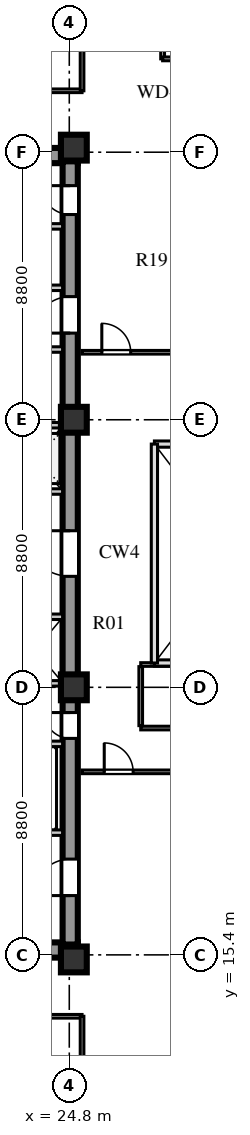
"""IFC4 building model, lengths in metres.
Left out: names, types, materials, properties, quantities, classifications, styles, units other than length and angle.
Written with IfcOpenShell. Run it as: python <this file> out.ifc"""

import sys

from ifc_helpers import new_model, si_unit, direction, frame, frame_2d, origin, origin_2d, place, context, subcontext, project, spatial, rectangle, extrude, element, fill, save


model = new_model("IFC4")
c1 = context("Model", 3, precision=1e-05, world=origin(), true_north=direction((0.0, 1.0)))
c2 = subcontext(c1, "Body", "Model", "MODEL_VIEW")
j1 = project(units=[si_unit("LENGTHUNIT", "METRE"), si_unit("PLANEANGLEUNIT", "RADIAN")], contexts=[c1])
p1 = place(None, origin())
s1 = spatial("IfcSite", under=j1, at=p1, CompositionType="ELEMENT")
p2 = place(p1, origin())
s2 = spatial("IfcBuilding", under=s1, at=p2, CompositionType="ELEMENT")
p3 = place(p2, frame((0.0, 0.0, 104.0)))
s3 = spatial("IfcBuildingStorey", under=s2, at=p3, CompositionType="ELEMENT", Elevation=104.0)
for number, where, z_axis, x_axis in (
    (1, (15.4, 15.56, 0.0), (0.0, 0.0, 1.0), (1.0, 0.0, 0.0)),
    (2, (15.4, 41.69, 0.0), (0.0, 0.0, 1.0), (1.0, 0.0, 0.0)),
):
    element("IfcWall", number, at=place(p3, frame(where, z_axis=z_axis, x_axis=x_axis)), inside=s3, PredefinedType="SHEAR", context=c2, shape_type="SweptSolid", body=[
        extrude(rectangle(XDim=9.68, YDim=0.5, at=frame_2d((4.84, 0.0))), origin(), (0.0, 0.0, 1.0), 3.6),
    ])
p4 = place(p3, frame((24.83, 15.74, 0.0), z_axis=(0.0, 0.0, 1.0), x_axis=(0.0, 1.0, 0.0)))
e3 = element("IfcWall", 3, at=p4, inside=s3, PredefinedType="SHEAR", context=c2, shape_type="SweptSolid", body=[
    extrude(rectangle(XDim=25.76, YDim=0.5, at=frame_2d((12.88, 0.0))), origin(), (0.0, 0.0, 1.0), 3.6),
])
p5 = place(p4, frame((1.61, 0.0, 0.0)))
e4 = element("IfcOpeningElement", 4, at=p5, cuts=e3, PredefinedType="OPENING", context=c2, shape_type="SweptSolid", body=[
    extrude(rectangle(XDim=1.2, YDim=2.1, at=frame_2d((0.6, 1.05))), frame((0.0, 0.26, 0.0), z_axis=(0.0, -1.0, 0.0), x_axis=(1.0, 0.0, 0.0)), (0.0, 0.0, 1.0), 0.52),
])
p6 = place(p4, frame((6.78, 0.0, 0.0)))
e5 = element("IfcOpeningElement", 5, at=p6, cuts=e3, PredefinedType="OPENING", context=c2, shape_type="SweptSolid", body=[
    extrude(rectangle(XDim=0.85, YDim=2.06, at=frame_2d((0.425, 1.03))), frame((0.0, 0.26, 0.0), z_axis=(0.0, -1.0, 0.0), x_axis=(1.0, 0.0, 0.0)), (0.0, 0.0, 1.0), 0.52),
])
p7 = place(p4, frame((12.11, 0.0, 0.0)))
e6 = element("IfcOpeningElement", 6, at=p7, cuts=e3, PredefinedType="OPENING", context=c2, shape_type="SweptSolid", body=[
    extrude(rectangle(XDim=1.5, YDim=2.12, at=frame_2d((0.75, 1.06))), frame((0.0, 0.26, 0.0), z_axis=(0.0, -1.0, 0.0), x_axis=(1.0, 0.0, 0.0)), (0.0, 0.0, 1.0), 0.52),
])
p8 = place(p4, frame((20.11, 0.0, 0.0)))
e7 = element("IfcOpeningElement", 7, at=p8, cuts=e3, PredefinedType="OPENING", context=c2, shape_type="SweptSolid", body=[
    extrude(rectangle(XDim=1.2, YDim=2.12, at=frame_2d((0.6, 1.06))), frame((0.0, 0.26, 0.0), z_axis=(0.0, -1.0, 0.0), x_axis=(1.0, 0.0, 0.0)), (0.0, 0.0, 1.0), 0.52),
])
p9 = place(p4, frame((24.01, 0.0, 0.0)))
e8 = element("IfcOpeningElement", 8, at=p9, cuts=e3, PredefinedType="OPENING", context=c2, shape_type="SweptSolid", body=[
    extrude(rectangle(XDim=0.95, YDim=2.1, at=frame_2d((0.475, 1.05))), frame((0.0, 0.26, 0.0), z_axis=(0.0, -1.0, 0.0), x_axis=(1.0, 0.0, 0.0)), (0.0, 0.0, 1.0), 0.52),
])
for number, where, z_axis, x_axis in (
    (9, (24.95, 15.25, 0.0), (0.0, 0.0, 1.0), (1.0, 0.0, 0.0)),
    (10, (24.95, 24.2, 0.0), (0.0, 0.0, 1.0), (1.0, 0.0, 0.0)),
    (11, (24.95, 33.0, 0.0), (0.0, 0.0, 1.0), (1.0, 0.0, 0.0)),
    (12, (24.95, 41.95, 0.0), (0.0, 0.0, 1.0), (1.0, 0.0, 0.0)),
):
    element("IfcColumn", number, at=place(p3, frame(where, z_axis=z_axis, x_axis=x_axis)), inside=s3, PredefinedType="COLUMN", context=c2, shape_type="SweptSolid", body=[
        extrude(rectangle(XDim=0.85, YDim=0.85, at=origin_2d()), origin(), (0.0, 0.0, 1.0), 3.6),
    ])
p10 = place(p3, frame((19.64, 19.42, 0.0), z_axis=(0.0, 0.0, 1.0), x_axis=(1.0, 0.0, 0.0)))
e13 = element("IfcWall", 13, at=p10, inside=s3, PredefinedType="SOLIDWALL", context=c2, shape_type="SweptSolid", body=[
    extrude(rectangle(XDim=4.94, YDim=0.18, at=frame_2d((2.47, 0.0))), origin(), (0.0, 0.0, 1.0), 3.6),
])
p11 = place(p10, frame((0.72, 0.0, 0.0)))
e14 = element("IfcOpeningElement", 14, at=p11, cuts=e13, PredefinedType="OPENING", context=c2, shape_type="SweptSolid", body=[
    extrude(rectangle(XDim=1.1, YDim=2.1, at=frame_2d((0.55, 1.05))), frame((0.0, 0.1, 0.0), z_axis=(0.0, -1.0, 0.0), x_axis=(1.0, 0.0, 0.0)), (0.0, 0.0, 1.0), 0.2),
])
p12 = place(p10, frame((3.02, 0.0, 0.0)))
e15 = element("IfcOpeningElement", 15, at=p12, cuts=e13, PredefinedType="OPENING", context=c2, shape_type="SweptSolid", body=[
    extrude(rectangle(XDim=1.1, YDim=2.1, at=frame_2d((0.55, 1.05))), frame((0.0, 0.1, 0.0), z_axis=(0.0, -1.0, 0.0), x_axis=(1.0, 0.0, 0.0)), (0.0, 0.0, 1.0), 0.2),
])
p13 = place(p3, frame((19.64, 22.34, 0.0), z_axis=(0.0, 0.0, 1.0), x_axis=(1.0, 0.0, 0.0)))
e16 = element("IfcWall", 16, at=p13, inside=s3, PredefinedType="SOLIDWALL", context=c2, shape_type="SweptSolid", body=[
    extrude(rectangle(XDim=4.94, YDim=0.18, at=frame_2d((2.47, 0.0))), origin(), (0.0, 0.0, 1.0), 3.6),
])
p14 = place(p3, frame((15.9, 26.52, 0.0), z_axis=(0.0, 0.0, 1.0), x_axis=(1.0, 0.0, 0.0)))
e17 = element("IfcWall", 17, at=p14, inside=s3, PredefinedType="SOLIDWALL", context=c2, shape_type="SweptSolid", body=[
    extrude(rectangle(XDim=8.68, YDim=0.18, at=frame_2d((4.34, 0.0))), origin(), (0.0, 0.0, 1.0), 3.6),
])
p15 = place(p3, frame((15.9, 24.33, 0.0), z_axis=(0.0, 0.0, 1.0), x_axis=(1.0, 0.0, 0.0)))
e18 = element("IfcWall", 18, at=p15, inside=s3, PredefinedType="SOLIDWALL", context=c2, shape_type="SweptSolid", body=[
    extrude(rectangle(XDim=8.68, YDim=0.18, at=frame_2d((4.34, 0.0))), origin(), (0.0, 0.0, 1.0), 2.95),
])
p16 = place(p3, frame((15.9, 30.64, 0.0), z_axis=(0.0, 0.0, 1.0), x_axis=(1.0, 0.0, 0.0)))
e19 = element("IfcWall", 19, at=p16, inside=s3, PredefinedType="SOLIDWALL", context=c2, shape_type="SweptSolid", body=[
    extrude(rectangle(XDim=8.68, YDim=0.18, at=frame_2d((4.34, 0.0))), origin(), (0.0, 0.0, 1.0), 3.6),
])
p17 = place(p16, frame((1.76, 0.0, 0.0)))
e20 = element("IfcOpeningElement", 20, at=p17, cuts=e19, PredefinedType="OPENING", context=c2, shape_type="SweptSolid", body=[
    extrude(rectangle(XDim=1.0, YDim=2.1, at=frame_2d((0.5, 1.05))), frame((0.0, 0.1, 0.0), z_axis=(0.0, -1.0, 0.0), x_axis=(1.0, 0.0, 0.0)), (0.0, 0.0, 1.0), 0.2),
])
p18 = place(p16, frame((3.6, 0.0, 0.0)))
e21 = element("IfcOpeningElement", 21, at=p18, cuts=e19, PredefinedType="OPENING", context=c2, shape_type="SweptSolid", body=[
    extrude(rectangle(XDim=1.0, YDim=2.1, at=frame_2d((0.5, 1.05))), frame((0.0, 0.1, 0.0), z_axis=(0.0, -1.0, 0.0), x_axis=(1.0, 0.0, 0.0)), (0.0, 0.0, 1.0), 0.2),
])
p19 = place(p16, frame((5.44, 0.0, 0.0)))
e22 = element("IfcOpeningElement", 22, at=p19, cuts=e19, PredefinedType="OPENING", context=c2, shape_type="SweptSolid", body=[
    extrude(rectangle(XDim=1.0, YDim=2.1, at=frame_2d((0.5, 1.05))), frame((0.0, 0.1, 0.0), z_axis=(0.0, -1.0, 0.0), x_axis=(1.0, 0.0, 0.0)), (0.0, 0.0, 1.0), 0.2),
])
p20 = place(p16, frame((7.28, 0.0, 0.0)))
e23 = element("IfcOpeningElement", 23, at=p20, cuts=e19, PredefinedType="OPENING", context=c2, shape_type="SweptSolid", body=[
    extrude(rectangle(XDim=1.0, YDim=2.1, at=frame_2d((0.5, 1.05))), frame((0.0, 0.1, 0.0), z_axis=(0.0, -1.0, 0.0), x_axis=(1.0, 0.0, 0.0)), (0.0, 0.0, 1.0), 0.2),
])
p21 = place(p3, frame((15.9, 32.82, 0.0), z_axis=(0.0, 0.0, 1.0), x_axis=(1.0, 0.0, 0.0)))
e24 = element("IfcWall", 24, at=p21, inside=s3, PredefinedType="SOLIDWALL", context=c2, shape_type="SweptSolid", body=[
    extrude(rectangle(XDim=8.68, YDim=0.18, at=frame_2d((4.34, 0.0))), origin(), (0.0, 0.0, 1.0), 2.95),
])
p22 = place(p3, frame((22.02, 35.31, 0.0), z_axis=(0.0, 0.0, 1.0), x_axis=(1.0, 0.0, 0.0)))
e25 = element("IfcWall", 25, at=p22, inside=s3, PredefinedType="SOLIDWALL", context=c2, shape_type="SweptSolid", body=[
    extrude(rectangle(XDim=2.56, YDim=0.18, at=frame_2d((1.28, 0.0))), origin(), (0.0, 0.0, 1.0), 3.6),
])
p23 = place(p22, frame((0.55, 0.0, 0.0)))
e26 = element("IfcOpeningElement", 26, at=p23, cuts=e25, PredefinedType="OPENING", context=c2, shape_type="SweptSolid", body=[
    extrude(rectangle(XDim=1.0, YDim=2.1, at=frame_2d((0.5, 1.05))), frame((0.0, 0.1, 0.0), z_axis=(0.0, -1.0, 0.0), x_axis=(1.0, 0.0, 0.0)), (0.0, 0.0, 1.0), 0.2),
])
p24 = place(p3, frame((19.64, 37.34, 0.0), z_axis=(0.0, 0.0, 1.0), x_axis=(1.0, 0.0, 0.0)))
e27 = element("IfcWall", 27, at=p24, inside=s3, PredefinedType="SOLIDWALL", context=c2, shape_type="SweptSolid", body=[
    extrude(rectangle(XDim=4.94, YDim=0.18, at=frame_2d((2.47, 0.0))), origin(), (0.0, 0.0, 1.0), 3.6),
])
p25 = place(p24, frame((0.45, 0.0, 0.0)))
e28 = element("IfcOpeningElement", 28, at=p25, cuts=e27, PredefinedType="OPENING", context=c2, shape_type="SweptSolid", body=[
    extrude(rectangle(XDim=1.0, YDim=2.1, at=frame_2d((0.5, 1.05))), frame((0.0, 0.1, 0.0), z_axis=(0.0, -1.0, 0.0), x_axis=(1.0, 0.0, 0.0)), (0.0, 0.0, 1.0), 0.2),
])
p26 = place(p24, frame((2.5, 0.0, 0.0)))
e29 = element("IfcOpeningElement", 29, at=p26, cuts=e27, PredefinedType="OPENING", context=c2, shape_type="SweptSolid", body=[
    extrude(rectangle(XDim=1.0, YDim=2.1, at=frame_2d((0.5, 1.05))), frame((0.0, 0.1, 0.0), z_axis=(0.0, -1.0, 0.0), x_axis=(1.0, 0.0, 0.0)), (0.0, 0.0, 1.0), 0.2),
])
p27 = place(p3, frame((19.64, 39.36, 0.0), z_axis=(0.0, 0.0, 1.0), x_axis=(1.0, 0.0, 0.0)))
e30 = element("IfcWall", 30, at=p27, inside=s3, PredefinedType="SOLIDWALL", context=c2, shape_type="SweptSolid", body=[
    extrude(rectangle(XDim=4.94, YDim=0.18, at=frame_2d((2.47, 0.0))), origin(), (0.0, 0.0, 1.0), 3.6),
])
p28 = place(p3, frame((25.22, 21.42, 0.0), z_axis=(0.0, 0.0, 1.0), x_axis=(1.0, 0.0, 0.0)))
e31 = element("IfcWall", 31, at=p28, inside=s3, PredefinedType="PARTITIONING", context=c2, shape_type="SweptSolid", body=[
    extrude(rectangle(XDim=15.6, YDim=0.12, at=frame_2d((7.8, 0.0))), origin(), (0.0, 0.0, 1.0), 3.2),
])
p29 = place(p28, frame((0.73, 0.0, 0.0)))
e32 = element("IfcOpeningElement", 32, at=p29, cuts=e31, PredefinedType="OPENING", context=c2, shape_type="SweptSolid", body=[
    extrude(rectangle(XDim=0.95, YDim=2.1, at=frame_2d((0.475, 1.05))), frame((0.0, 0.07, 0.0), z_axis=(0.0, -1.0, 0.0), x_axis=(1.0, 0.0, 0.0)), (0.0, 0.0, 1.0), 0.14),
])
p30 = place(p3, frame((27.15, 22.86, 0.0), z_axis=(0.0, 0.0, 1.0), x_axis=(1.0, 0.0, 0.0)))
e33 = element("IfcWall", 33, at=p30, inside=s3, PredefinedType="PARTITIONING", context=c2, shape_type="SweptSolid", body=[
    extrude(rectangle(XDim=13.67, YDim=0.12, at=frame_2d((6.835, 0.0))), origin(), (0.0, 0.0, 1.0), 3.6),
])
p31 = place(p30, frame((2.2, 0.0, 0.0)))
e34 = element("IfcOpeningElement", 34, at=p31, cuts=e33, PredefinedType="OPENING", context=c2, shape_type="SweptSolid", body=[
    extrude(rectangle(XDim=0.9, YDim=2.08, at=frame_2d((0.45, 1.04))), frame((0.0, 0.07, 0.0), z_axis=(0.0, -1.0, 0.0), x_axis=(1.0, 0.0, 0.0)), (0.0, 0.0, 1.0), 0.14),
])
p32 = place(p3, frame((25.22, 35.22, 0.0), z_axis=(0.0, 0.0, 1.0), x_axis=(1.0, 0.0, 0.0)))
e35 = element("IfcWall", 35, at=p32, inside=s3, PredefinedType="PARTITIONING", context=c2, shape_type="SweptSolid", body=[
    extrude(rectangle(XDim=9.5, YDim=0.12, at=frame_2d((4.75, 0.0))), origin(), (0.0, 0.0, 1.0), 3.6),
])
p33 = place(p32, frame((0.65, 0.0, 0.0)))
e36 = element("IfcOpeningElement", 36, at=p33, cuts=e35, PredefinedType="OPENING", context=c2, shape_type="SweptSolid", body=[
    extrude(rectangle(XDim=0.95, YDim=2.1, at=frame_2d((0.475, 1.05))), frame((0.0, 0.07, 0.0), z_axis=(0.0, -1.0, 0.0), x_axis=(1.0, 0.0, 0.0)), (0.0, 0.0, 1.0), 0.14),
])
p34 = place(p32, frame((5.4, 0.0, 0.0)))
e37 = element("IfcOpeningElement", 37, at=p34, cuts=e35, PredefinedType="OPENING", context=c2, shape_type="SweptSolid", body=[
    extrude(rectangle(XDim=1.05, YDim=2.1, at=frame_2d((0.525, 1.05))), frame((0.0, 0.07, 0.0), z_axis=(0.0, -1.0, 0.0), x_axis=(1.0, 0.0, 0.0)), (0.0, 0.0, 1.0), 0.14),
])
p35 = place(p3, frame((13.59, 13.38, 0.0), z_axis=(0.0, 0.0, 1.0), x_axis=(1.0, 0.0, 0.0)))
e38 = element("IfcWall", 38, at=p35, inside=s3, PredefinedType="PARTITIONING", context=c2, shape_type="SweptSolid", body=[
    extrude(rectangle(XDim=11.63, YDim=0.12, at=frame_2d((5.815, 0.0))), origin(), (0.0, 0.0, 1.0), 3.6),
])
p36 = place(p35, frame((4.56, 0.0, 0.0)))
e39 = element("IfcOpeningElement", 39, at=p36, cuts=e38, PredefinedType="OPENING", context=c2, shape_type="SweptSolid", body=[
    extrude(rectangle(XDim=1.0, YDim=2.08, at=frame_2d((0.5, 1.04))), frame((0.0, 0.07, 0.0), z_axis=(0.0, -1.0, 0.0), x_axis=(1.0, 0.0, 0.0)), (0.0, 0.0, 1.0), 0.14),
])
p37 = place(p3, frame((25.22, 10.28, 0.0), z_axis=(0.0, 0.0, 1.0), x_axis=(0.0, 1.0, 0.0)))
e40 = element("IfcWall", 40, at=p37, inside=s3, PredefinedType="PARTITIONING", context=c2, shape_type="SweptSolid", body=[
    extrude(rectangle(XDim=3.1, YDim=0.12, at=frame_2d((1.55, 0.0))), origin(), (0.0, 0.0, 1.0), 3.1),
])
p38 = place(p3, frame((13.59, 43.82, 0.0), z_axis=(0.0, 0.0, 1.0), x_axis=(1.0, 0.0, 0.0)))
e41 = element("IfcWall", 41, at=p38, inside=s3, PredefinedType="PARTITIONING", context=c2, shape_type="SweptSolid", body=[
    extrude(rectangle(XDim=11.63, YDim=0.12, at=frame_2d((5.815, 0.0))), origin(), (0.0, 0.0, 1.0), 3.6),
])
p39 = place(p38, frame((4.56, 0.0, 0.0)))
e42 = element("IfcOpeningElement", 42, at=p39, cuts=e41, PredefinedType="OPENING", context=c2, shape_type="SweptSolid", body=[
    extrude(rectangle(XDim=1.0, YDim=2.08, at=frame_2d((0.5, 1.04))), frame((0.0, 0.07, 0.0), z_axis=(0.0, -1.0, 0.0), x_axis=(1.0, 0.0, 0.0)), (0.0, 0.0, 1.0), 0.14),
])
p40 = place(p3, frame((25.22, 43.82, 0.0), z_axis=(0.0, 0.0, 1.0), x_axis=(0.0, 1.0, 0.0)))
e43 = element("IfcWall", 43, at=p40, inside=s3, PredefinedType="PARTITIONING", context=c2, shape_type="SweptSolid", body=[
    extrude(rectangle(XDim=3.1, YDim=0.12, at=frame_2d((1.55, 0.0))), origin(), (0.0, 0.0, 1.0), 3.1),
])
p41 = place(p3, frame((27.15, 24.95, 0.0), z_axis=(0.0, 0.0, 1.0), x_axis=(1.0, 0.0, 0.0)))
e44 = element("IfcWall", 44, at=p41, inside=s3, PredefinedType="PARTITIONING", context=c2, shape_type="SweptSolid", body=[
    extrude(rectangle(XDim=9.67, YDim=0.12, at=frame_2d((4.835, 0.0))), origin(), (0.0, 0.0, 1.0), 3.05),
])
p42 = place(p3, frame((27.15, 22.94, 0.0), z_axis=(0.0, 0.0, 1.0), x_axis=(0.0, 1.0, 0.0)))
e45 = element("IfcWall", 45, at=p42, inside=s3, PredefinedType="PARTITIONING", context=c2, shape_type="SweptSolid", body=[
    extrude(rectangle(XDim=1.94, YDim=0.12, at=frame_2d((0.97, 0.0))), origin(), (0.0, 0.0, 1.0), 3.6),
])
p43 = place(p3, frame((27.87, 44.87, 0.0), z_axis=(0.0, 0.0, 1.0), x_axis=(0.0, 1.0, 0.0)))
e46 = element("IfcWall", 46, at=p43, inside=s3, PredefinedType="PLUMBINGWALL", context=c2, shape_type="SweptSolid", body=[
    extrude(rectangle(XDim=2.05, YDim=0.125, at=frame_2d((1.025, 0.0))), origin(), (0.0, 0.0, 1.0), 3.6),
])
p44 = place(p3, frame((27.87, 44.87, 0.0), z_axis=(0.0, 0.0, 1.0), x_axis=(1.0, 0.0, 0.0)))
e47 = element("IfcWall", 47, at=p44, inside=s3, PredefinedType="PLUMBINGWALL", context=c2, shape_type="SweptSolid", body=[
    extrude(rectangle(XDim=2.05, YDim=0.125, at=frame_2d((1.025, 0.0))), origin(), (0.0, 0.0, 1.0), 3.6),
])
p45 = place(p44, frame((0.55, 0.0, 0.0)))
e48 = element("IfcOpeningElement", 48, at=p45, cuts=e47, PredefinedType="OPENING", context=c2, shape_type="SweptSolid", body=[
    extrude(rectangle(XDim=0.8, YDim=2.05, at=frame_2d((0.4, 1.025))), frame((0.0, 0.073, 0.0), z_axis=(0.0, -1.0, 0.0), x_axis=(1.0, 0.0, 0.0)), (0.0, 0.0, 1.0), 0.145),
])
p46 = place(p5, frame((1.2, 0.0, 0.0), z_axis=(0.0, 0.0, 1.0), x_axis=(-1.0, 0.0, 0.0)))
e49 = element("IfcDoor", 49, at=p46, inside=s3, OperationType="SINGLE_SWING_RIGHT", PredefinedType="DOOR", context=c2, shape_type="SweptSolid", body=[
    extrude(rectangle(XDim=1.2, YDim=2.1, at=frame_2d((0.6, 1.05))), frame((0.0, 0.025, 0.0), z_axis=(0.0, -1.0, 0.0), x_axis=(1.0, 0.0, 0.0)), (0.0, 0.0, 1.0), 0.05),
])
fill(e4, e49)
p47 = place(p6, frame((0.85, 0.0, 0.0), z_axis=(0.0, 0.0, 1.0), x_axis=(-1.0, 0.0, 0.0)))
e50 = element("IfcDoor", 50, at=p47, inside=s3, OperationType="SINGLE_SWING_LEFT", PredefinedType="DOOR", context=c2, shape_type="SweptSolid", body=[
    extrude(rectangle(XDim=0.85, YDim=2.06, at=frame_2d((0.425, 1.03))), frame((0.0, 0.025, 0.0), z_axis=(0.0, -1.0, 0.0), x_axis=(1.0, 0.0, 0.0)), (0.0, 0.0, 1.0), 0.05),
])
fill(e5, e50)
p48 = place(p7, frame((1.5, 0.0, 0.0), z_axis=(0.0, 0.0, 1.0), x_axis=(-1.0, 0.0, 0.0)))
e51 = element("IfcDoor", 51, at=p48, inside=s3, OperationType="SINGLE_SWING_LEFT", PredefinedType="DOOR", context=c2, shape_type="SweptSolid", body=[
    extrude(rectangle(XDim=1.5, YDim=2.12, at=frame_2d((0.75, 1.06))), frame((0.0, 0.025, 0.0), z_axis=(0.0, -1.0, 0.0), x_axis=(1.0, 0.0, 0.0)), (0.0, 0.0, 1.0), 0.05),
])
fill(e6, e51)
p49 = place(p8, frame((1.2, 0.0, 0.0), z_axis=(0.0, 0.0, 1.0), x_axis=(-1.0, 0.0, 0.0)))
e52 = element("IfcDoor", 52, at=p49, inside=s3, OperationType="SINGLE_SWING_RIGHT", PredefinedType="DOOR", context=c2, shape_type="SweptSolid", body=[
    extrude(rectangle(XDim=1.2, YDim=2.12, at=frame_2d((0.6, 1.06))), frame((0.0, 0.025, 0.0), z_axis=(0.0, -1.0, 0.0), x_axis=(1.0, 0.0, 0.0)), (0.0, 0.0, 1.0), 0.05),
])
fill(e7, e52)
p50 = place(p9, frame((0.95, 0.0, 0.0), z_axis=(0.0, 0.0, 1.0), x_axis=(-1.0, 0.0, 0.0)))
e53 = element("IfcDoor", 53, at=p50, inside=s3, OperationType="SINGLE_SWING_LEFT", PredefinedType="DOOR", context=c2, shape_type="SweptSolid", body=[
    extrude(rectangle(XDim=0.95, YDim=2.1, at=frame_2d((0.475, 1.05))), frame((0.0, 0.025, 0.0), z_axis=(0.0, -1.0, 0.0), x_axis=(1.0, 0.0, 0.0)), (0.0, 0.0, 1.0), 0.05),
])
fill(e8, e53)
p51 = place(p29, frame((0.95, 0.0, 0.0), z_axis=(0.0, 0.0, 1.0), x_axis=(-1.0, 0.0, 0.0)))
e54 = element("IfcDoor", 54, at=p51, inside=s3, OperationType="SINGLE_SWING_RIGHT", PredefinedType="DOOR", context=c2, shape_type="SweptSolid", body=[
    extrude(rectangle(XDim=0.95, YDim=2.1, at=frame_2d((0.475, 1.05))), frame((0.0, 0.025, 0.0), z_axis=(0.0, -1.0, 0.0), x_axis=(1.0, 0.0, 0.0)), (0.0, 0.0, 1.0), 0.05),
])
fill(e32, e54)
p52 = place(p33, origin())
e55 = element("IfcDoor", 55, at=p52, inside=s3, OperationType="SINGLE_SWING_LEFT", PredefinedType="DOOR", context=c2, shape_type="SweptSolid", body=[
    extrude(rectangle(XDim=0.95, YDim=2.1, at=frame_2d((0.475, 1.05))), frame((0.0, 0.025, 0.0), z_axis=(0.0, -1.0, 0.0), x_axis=(1.0, 0.0, 0.0)), (0.0, 0.0, 1.0), 0.05),
])
fill(e36, e55)
save(model, sys.argv[1])
